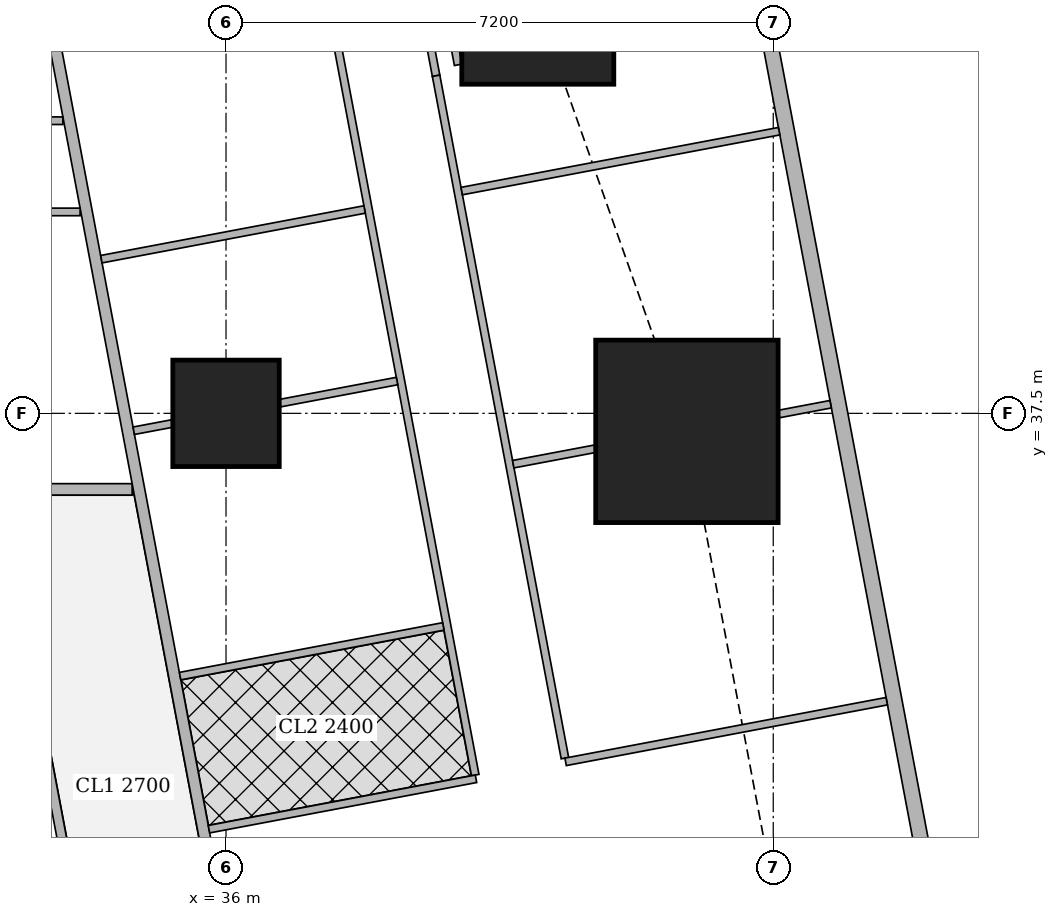
"""IFC4 building model, lengths in metres.
Left out: names, types, materials, properties, quantities, classifications, styles, units other than length and angle.
Written with IfcOpenShell. Run it as: python <this file> out.ifc"""

import sys

from ifc_helpers import new_model, si_unit, direction, frame, frame_2d, origin, origin_2d, place, context, subcontext, project, spatial, rectangle, extrude, element, fill, save


model = new_model("IFC4")
c1 = context("Model", 3, precision=1e-05, world=origin(), true_north=direction((0.0, 1.0)))
c2 = subcontext(c1, "Body", "Model", "MODEL_VIEW")
j1 = project(units=[si_unit("LENGTHUNIT", "METRE"), si_unit("PLANEANGLEUNIT", "RADIAN")], contexts=[c1])
p1 = place(None, origin())
s1 = spatial("IfcSite", under=j1, at=p1, CompositionType="ELEMENT")
p2 = place(p1, origin())
s2 = spatial("IfcBuilding", under=s1, at=p2, CompositionType="ELEMENT")
p3 = place(p2, frame((0.0, 0.0, 204.95)))
s3 = spatial("IfcBuildingStorey", under=s2, at=p3, CompositionType="ELEMENT", Elevation=204.95)
p4 = place(p3, frame((36.0, 37.5, 0.0), z_axis=(0.0, 0.0, 1.0), x_axis=(1.0, 0.0, 0.0)))
e1 = element("IfcColumn", 1, at=p4, inside=s3, PredefinedType="COLUMN", context=c2, shape_type="SweptSolid", body=[
    extrude(rectangle(XDim=1.4, YDim=1.4, at=origin_2d()), origin(), (0.0, 0.0, 1.0), 3.75),
])
p5 = place(p3, frame((42.064, 37.263, 0.0), z_axis=(0.0, 0.0, 1.0), x_axis=(1.0, 0.0, 0.0)))
e2 = element("IfcColumn", 2, at=p5, inside=s3, PredefinedType="COLUMN", context=c2, shape_type="SweptSolid", body=[
    extrude(rectangle(XDim=2.4, YDim=2.4, at=origin_2d()), origin(), (0.0, 0.0, 1.0), 3.75),
])
p6 = place(p3, frame((40.102, 42.83, 0.0), z_axis=(0.0, 0.0, 1.0), x_axis=(1.0, 0.0, 0.0)))
e3 = element("IfcColumn", 3, at=p6, inside=s3, PredefinedType="COLUMN", context=c2, shape_type="SweptSolid", body=[
    extrude(rectangle(XDim=2.0, YDim=2.0, at=origin_2d()), origin(), (0.0, 0.0, 1.0), 3.75),
])
p7 = place(p3, frame((50.653, 2.703, 0.0), z_axis=(0.0, 0.0, 1.0), x_axis=(-0.185612026696, 0.982623109613, 0.0)))
e4 = element("IfcWall", 4, at=p7, inside=s3, PredefinedType="SOLIDWALL", context=c2, shape_type="SweptSolid", body=[
    extrude(rectangle(XDim=41.393, YDim=0.2, at=frame_2d((20.697, 0.0))), origin(), (0.0, 0.0, 1.0), 3.5),
])
p8 = place(p7, frame((1.633, 0.0, 0.9)))
e5 = element("IfcOpeningElement", 5, at=p8, cuts=e4, PredefinedType="OPENING", context=c2, shape_type="SweptSolid", body=[
    extrude(rectangle(XDim=1.8, YDim=1.5, at=frame_2d((0.9, 0.75))), frame((0.0, 0.11, 0.0), z_axis=(0.0, -1.0, 0.0), x_axis=(1.0, 0.0, 0.0)), (0.0, 0.0, 1.0), 0.22),
])
p9 = place(p7, frame((6.032, 0.0, 0.9)))
e6 = element("IfcOpeningElement", 6, at=p9, cuts=e4, PredefinedType="OPENING", context=c2, shape_type="SweptSolid", body=[
    extrude(rectangle(XDim=1.8, YDim=1.5, at=frame_2d((0.9, 0.75))), frame((0.0, 0.11, 0.0), z_axis=(0.0, -1.0, 0.0), x_axis=(1.0, 0.0, 0.0)), (0.0, 0.0, 1.0), 0.22),
])
p10 = place(p7, frame((9.848, 0.0, 0.9)))
e7 = element("IfcOpeningElement", 7, at=p10, cuts=e4, PredefinedType="OPENING", context=c2, shape_type="SweptSolid", body=[
    extrude(rectangle(XDim=1.8, YDim=1.5, at=frame_2d((0.9, 0.75))), frame((0.0, 0.11, 0.0), z_axis=(0.0, -1.0, 0.0), x_axis=(1.0, 0.0, 0.0)), (0.0, 0.0, 1.0), 0.22),
])
p11 = place(p7, frame((13.664, 0.0, 0.9)))
e8 = element("IfcOpeningElement", 8, at=p11, cuts=e4, PredefinedType="OPENING", context=c2, shape_type="SweptSolid", body=[
    extrude(rectangle(XDim=1.8, YDim=1.5, at=frame_2d((0.9, 0.75))), frame((0.0, 0.11, 0.0), z_axis=(0.0, -1.0, 0.0), x_axis=(1.0, 0.0, 0.0)), (0.0, 0.0, 1.0), 0.22),
])
p12 = place(p7, frame((17.481, 0.0, 0.9)))
e9 = element("IfcOpeningElement", 9, at=p12, cuts=e4, PredefinedType="OPENING", context=c2, shape_type="SweptSolid", body=[
    extrude(rectangle(XDim=1.8, YDim=1.5, at=frame_2d((0.9, 0.75))), frame((0.0, 0.11, 0.0), z_axis=(0.0, -1.0, 0.0), x_axis=(1.0, 0.0, 0.0)), (0.0, 0.0, 1.0), 0.22),
])
p13 = place(p7, frame((21.297, 0.0, 0.9)))
e10 = element("IfcOpeningElement", 10, at=p13, cuts=e4, PredefinedType="OPENING", context=c2, shape_type="SweptSolid", body=[
    extrude(rectangle(XDim=1.8, YDim=1.5, at=frame_2d((0.9, 0.75))), frame((0.0, 0.11, 0.0), z_axis=(0.0, -1.0, 0.0), x_axis=(1.0, 0.0, 0.0)), (0.0, 0.0, 1.0), 0.22),
])
p14 = place(p7, frame((25.113, 0.0, 0.9)))
e11 = element("IfcOpeningElement", 11, at=p14, cuts=e4, PredefinedType="OPENING", context=c2, shape_type="SweptSolid", body=[
    extrude(rectangle(XDim=1.8, YDim=1.5, at=frame_2d((0.9, 0.75))), frame((0.0, 0.11, 0.0), z_axis=(0.0, -1.0, 0.0), x_axis=(1.0, 0.0, 0.0)), (0.0, 0.0, 1.0), 0.22),
])
p15 = place(p7, frame((28.93, 0.0, 0.9)))
e12 = element("IfcOpeningElement", 12, at=p15, cuts=e4, PredefinedType="OPENING", context=c2, shape_type="SweptSolid", body=[
    extrude(rectangle(XDim=1.8, YDim=1.5, at=frame_2d((0.9, 0.75))), frame((0.0, 0.11, 0.0), z_axis=(0.0, -1.0, 0.0), x_axis=(1.0, 0.0, 0.0)), (0.0, 0.0, 1.0), 0.22),
])
p16 = place(p7, frame((32.746, 0.0, 0.9)))
e13 = element("IfcOpeningElement", 13, at=p16, cuts=e4, PredefinedType="OPENING", context=c2, shape_type="SweptSolid", body=[
    extrude(rectangle(XDim=1.8, YDim=1.5, at=frame_2d((0.9, 0.75))), frame((0.0, 0.11, 0.0), z_axis=(0.0, -1.0, 0.0), x_axis=(1.0, 0.0, 0.0)), (0.0, 0.0, 1.0), 0.22),
])
p17 = place(p7, frame((36.481, 0.0, 0.9)))
e14 = element("IfcOpeningElement", 14, at=p17, cuts=e4, PredefinedType="OPENING", context=c2, shape_type="SweptSolid", body=[
    extrude(rectangle(XDim=1.8, YDim=1.5, at=frame_2d((0.9, 0.75))), frame((0.0, 0.11, 0.0), z_axis=(0.0, -1.0, 0.0), x_axis=(1.0, 0.0, 0.0)), (0.0, 0.0, 1.0), 0.22),
])
p18 = place(p3, frame((9.001, 36.5, 0.0), z_axis=(0.0, 0.0, 1.0), x_axis=(1.0, 0.0, 0.0)))
e15 = element("IfcWall", 15, at=p18, inside=s3, PredefinedType="SOLIDWALL", context=c2, shape_type="SweptSolid", body=[
    extrude(rectangle(XDim=25.764, YDim=0.15, at=frame_2d((12.882, 0.0))), origin(), (0.0, 0.0, 1.0), 3.5),
])
p19 = place(p18, frame((0.874, 0.0, 0.0)))
e16 = element("IfcOpeningElement", 16, at=p19, cuts=e15, PredefinedType="OPENING", context=c2, shape_type="SweptSolid", body=[
    extrude(rectangle(XDim=1.0, YDim=2.1, at=frame_2d((0.5, 1.05))), frame((0.0, 0.085, 0.0), z_axis=(0.0, -1.0, 0.0), x_axis=(1.0, 0.0, 0.0)), (0.0, 0.0, 1.0), 0.17),
])
p20 = place(p18, frame((10.099, 0.0, 0.0)))
e17 = element("IfcOpeningElement", 17, at=p20, cuts=e15, PredefinedType="OPENING", context=c2, shape_type="SweptSolid", body=[
    extrude(rectangle(XDim=1.0, YDim=2.1, at=frame_2d((0.5, 1.05))), frame((0.0, 0.085, 0.0), z_axis=(0.0, -1.0, 0.0), x_axis=(1.0, 0.0, 0.0)), (0.0, 0.0, 1.0), 0.17),
])
p21 = place(p18, frame((17.356, 0.0, 0.0)))
e18 = element("IfcOpeningElement", 18, at=p21, cuts=e15, PredefinedType="OPENING", context=c2, shape_type="SweptSolid", body=[
    extrude(rectangle(XDim=1.0, YDim=2.1, at=frame_2d((0.5, 1.05))), frame((0.0, 0.085, 0.0), z_axis=(0.0, -1.0, 0.0), x_axis=(1.0, 0.0, 0.0)), (0.0, 0.0, 1.0), 0.17),
])
p22 = place(p3, frame((33.68, 42.723, 0.0), z_axis=(0.0, 0.0, 1.0), x_axis=(0.185601160014, -0.982625162207, 0.0)))
e19 = element("IfcWall", 19, at=p22, inside=s3, PredefinedType="SOLIDWALL", context=c2, shape_type="SweptSolid", body=[
    extrude(rectangle(XDim=41.051, YDim=0.15, at=frame_2d((20.526, 0.0))), origin(), (0.0, 0.0, 1.0), 2.5),
])
p23 = place(p22, frame((12.307, 0.0, 0.0)))
e20 = element("IfcOpeningElement", 20, at=p23, cuts=e19, PredefinedType="OPENING", context=c2, shape_type="SweptSolid", body=[
    extrude(rectangle(XDim=1.0, YDim=2.1, at=frame_2d((0.5, 1.05))), frame((0.0, 0.085, 0.0), z_axis=(0.0, -1.0, 0.0), x_axis=(1.0, 0.0, 0.0)), (0.0, 0.0, 1.0), 0.17),
])
p24 = place(p22, frame((16.123, 0.0, 0.0)))
e21 = element("IfcOpeningElement", 21, at=p24, cuts=e19, PredefinedType="OPENING", context=c2, shape_type="SweptSolid", body=[
    extrude(rectangle(XDim=1.0, YDim=2.1, at=frame_2d((0.5, 1.05))), frame((0.0, 0.085, 0.0), z_axis=(0.0, -1.0, 0.0), x_axis=(1.0, 0.0, 0.0)), (0.0, 0.0, 1.0), 0.17),
])
p25 = place(p22, frame((30.902, 0.0, 0.0)))
e22 = element("IfcOpeningElement", 22, at=p25, cuts=e19, PredefinedType="OPENING", context=c2, shape_type="SweptSolid", body=[
    extrude(rectangle(XDim=1.0, YDim=2.1, at=frame_2d((0.5, 1.05))), frame((0.0, 0.085, 0.0), z_axis=(0.0, -1.0, 0.0), x_axis=(1.0, 0.0, 0.0)), (0.0, 0.0, 1.0), 0.17),
])
p26 = place(p3, frame((39.054, 42.085, 0.0), z_axis=(0.0, 0.0, 1.0), x_axis=(-0.185791584218, 0.982589175207, 0.0)))
e23 = element("IfcWall", 23, at=p26, inside=s3, PredefinedType="PARTITIONING", context=c2, shape_type="SweptSolid", body=[
    extrude(rectangle(XDim=3.628, YDim=0.1, at=frame_2d((1.814, 0.0))), origin(), (0.0, 0.0, 1.0), 2.05),
])
p27 = place(p3, frame((38.256, 44.628, 0.0), z_axis=(0.0, 0.0, 1.0), x_axis=(0.185700639943, -0.982606366927, 0.0)))
e24 = element("IfcWall", 24, at=p27, inside=s3, PredefinedType="PARTITIONING", context=c2, shape_type="SweptSolid", body=[
    extrude(rectangle(XDim=2.735, YDim=0.1, at=frame_2d((1.367, 0.0))), origin(), (0.0, 0.0, 1.0), 2.05),
])
p28 = place(p3, frame((38.764, 41.941, 0.0), z_axis=(0.0, 0.0, 1.0), x_axis=(0.185548572312, -0.982635093671, 0.0)))
e25 = element("IfcWall", 25, at=p28, inside=s3, PredefinedType="PARTITIONING", context=c2, shape_type="SweptSolid", body=[
    extrude(rectangle(XDim=9.135, YDim=0.1, at=frame_2d((4.568, 0.0))), origin(), (0.0, 0.0, 1.0), 3.5),
])
p29 = place(p28, frame((8.085, 0.0, 0.0)))
e26 = element("IfcOpeningElement", 26, at=p29, cuts=e25, PredefinedType="OPENING", context=c2, shape_type="SweptSolid", body=[
    extrude(rectangle(XDim=0.9, YDim=2.1, at=frame_2d((0.45, 1.05))), frame((0.0, 0.06, 0.0), z_axis=(0.0, -1.0, 0.0), x_axis=(1.0, 0.0, 0.0)), (0.0, 0.0, 1.0), 0.12),
])
p30 = place(p28, frame((3.7, 0.0, 0.0)))
e27 = element("IfcOpeningElement", 27, at=p30, cuts=e25, PredefinedType="OPENING", context=c2, shape_type="SweptSolid", body=[
    extrude(rectangle(XDim=0.9, YDim=2.1, at=frame_2d((0.45, 1.05))), frame((0.0, 0.06, 0.0), z_axis=(0.0, -1.0, 0.0), x_axis=(1.0, 0.0, 0.0)), (0.0, 0.0, 1.0), 0.12),
])
p31 = place(p3, frame((37.473, 42.309, 0.0), z_axis=(0.0, 0.0, 1.0), x_axis=(0.185491912953, -0.982645790827, 0.0)))
e28 = element("IfcWall", 28, at=p31, inside=s3, PredefinedType="PARTITIONING", context=c2, shape_type="SweptSolid", body=[
    extrude(rectangle(XDim=9.737, YDim=0.1, at=frame_2d((4.869, 0.0))), origin(), (0.0, 0.0, 1.0), 3.5),
])
p32 = place(p31, frame((8.312, 0.0, 0.0)))
e29 = element("IfcOpeningElement", 29, at=p32, cuts=e28, PredefinedType="OPENING", context=c2, shape_type="SweptSolid", body=[
    extrude(rectangle(XDim=0.9, YDim=2.1, at=frame_2d((0.45, 1.05))), frame((0.0, 0.06, 0.0), z_axis=(0.0, -1.0, 0.0), x_axis=(1.0, 0.0, 0.0)), (0.0, 0.0, 1.0), 0.12),
])
p33 = place(p31, frame((2.853, 0.0, 0.0)))
e30 = element("IfcOpeningElement", 30, at=p33, cuts=e28, PredefinedType="OPENING", context=c2, shape_type="SweptSolid", body=[
    extrude(rectangle(XDim=0.9, YDim=2.1, at=frame_2d((0.45, 1.05))), frame((0.0, 0.06, 0.0), z_axis=(0.0, -1.0, 0.0), x_axis=(1.0, 0.0, 0.0)), (0.0, 0.0, 1.0), 0.12),
])
p34 = place(p31, frame((5.644, 0.0, 0.0)))
e31 = element("IfcOpeningElement", 31, at=p34, cuts=e28, PredefinedType="OPENING", context=c2, shape_type="SweptSolid", body=[
    extrude(rectangle(XDim=0.9, YDim=2.1, at=frame_2d((0.45, 1.05))), frame((0.0, 0.06, 0.0), z_axis=(0.0, -1.0, 0.0), x_axis=(1.0, 0.0, 0.0)), (0.0, 0.0, 1.0), 0.12),
])
p35 = place(p3, frame((43.277, 41.212, 0.0), z_axis=(0.0, 0.0, 1.0), x_axis=(-0.982665405803, -0.185387972203, 0.0)))
e32 = element("IfcWall", 32, at=p35, inside=s3, PredefinedType="PARTITIONING", context=c2, shape_type="SweptSolid", body=[
    extrude(rectangle(XDim=4.25, YDim=0.1, at=frame_2d((2.125, 0.0))), origin(), (0.0, 0.0, 1.0), 2.05),
])
p36 = place(p3, frame((43.955, 37.62, 0.0), z_axis=(0.0, 0.0, 1.0), x_axis=(-0.982495415327, -0.186286765128, 0.0)))
e33 = element("IfcWall", 33, at=p36, inside=s3, PredefinedType="PARTITIONING", context=c2, shape_type="SweptSolid", body=[
    extrude(rectangle(XDim=0.693, YDim=0.1, at=frame_2d((0.347, 0.0))), origin(), (0.0, 0.0, 1.0), 3.5),
])
p37 = place(p3, frame((40.854, 37.034, 0.0), z_axis=(0.0, 0.0, 1.0), x_axis=(-0.982651678759, -0.185460718839, 0.0)))
e34 = element("IfcWall", 34, at=p37, inside=s3, PredefinedType="PARTITIONING", context=c2, shape_type="SweptSolid", body=[
    extrude(rectangle(XDim=1.094, YDim=0.1, at=frame_2d((0.547, 0.0))), origin(), (0.0, 0.0, 1.0), 3.5),
])
p38 = place(p3, frame((44.693, 33.713, 0.0), z_axis=(0.0, 0.0, 1.0), x_axis=(-0.982633535512, -0.185556823879, 0.0)))
e35 = element("IfcWall", 35, at=p38, inside=s3, PredefinedType="PARTITIONING", context=c2, shape_type="SweptSolid", body=[
    extrude(rectangle(XDim=4.3, YDim=0.1, at=frame_2d((2.15, 0.0))), origin(), (0.0, 0.0, 1.0), 2.05),
])
p39 = place(p3, frame((37.823, 40.182, 0.0), z_axis=(0.0, 0.0, 1.0), x_axis=(-0.98263926043, -0.185526504472, 0.0)))
e36 = element("IfcWall", 36, at=p39, inside=s3, PredefinedType="PARTITIONING", context=c2, shape_type="SweptSolid", body=[
    extrude(rectangle(XDim=3.524, YDim=0.1, at=frame_2d((1.762, 0.0))), origin(), (0.0, 0.0, 1.0), 3.5),
])
p40 = place(p3, frame((38.25, 37.925, 0.0), z_axis=(0.0, 0.0, 1.0), x_axis=(-0.982610209589, -0.185680305934, 0.0)))
e37 = element("IfcWall", 37, at=p40, inside=s3, PredefinedType="PARTITIONING", context=c2, shape_type="SweptSolid", body=[
    extrude(rectangle(XDim=1.567, YDim=0.1, at=frame_2d((0.784, 0.0))), origin(), (0.0, 0.0, 1.0), 3.5),
])
p41 = place(p3, frame((35.29, 37.366, 0.0), z_axis=(0.0, 0.0, 1.0), x_axis=(-0.982715597703, -0.185121727606, 0.0)))
e38 = element("IfcWall", 38, at=p41, inside=s3, PredefinedType="PARTITIONING", context=c2, shape_type="SweptSolid", body=[
    extrude(rectangle(XDim=0.513, YDim=0.1, at=frame_2d((0.256, 0.0))), origin(), (0.0, 0.0, 1.0), 3.5),
])
p42 = place(p3, frame((39.289, 32.692, 0.0), z_axis=(0.0, 0.0, 1.0), x_axis=(-0.982662827464, -0.185401638399, 0.0)))
e39 = element("IfcWall", 39, at=p42, inside=s3, PredefinedType="PARTITIONING", context=c2, shape_type="SweptSolid", body=[
    extrude(rectangle(XDim=3.575, YDim=0.1, at=frame_2d((1.788, 0.0))), origin(), (0.0, 0.0, 1.0), 3.5),
])
p43 = place(p3, frame((38.859, 34.697, 0.0), z_axis=(0.0, 0.0, 1.0), x_axis=(-0.982626628545, -0.185593396635, 0.0)))
e40 = element("IfcWall", 40, at=p43, inside=s3, PredefinedType="PARTITIONING", context=c2, shape_type="SweptSolid", body=[
    extrude(rectangle(XDim=3.524, YDim=0.1, at=frame_2d((1.762, 0.0))), origin(), (0.0, 0.0, 1.0), 3.5),
])
p44 = place(p3, frame((28.8, 41.35, 0.0), z_axis=(0.0, 0.0, 1.0), x_axis=(1.0, 0.0, 0.0)))
e41 = element("IfcWall", 41, at=p44, inside=s3, PredefinedType="PARTITIONING", context=c2, shape_type="SweptSolid", body=[
    extrude(rectangle(XDim=5.053, YDim=0.1, at=frame_2d((2.526, 0.0))), origin(), (0.0, 0.0, 1.0), 3.5),
])
p45 = place(p44, frame((1.25, 0.0, 0.0)))
e42 = element("IfcOpeningElement", 42, at=p45, cuts=e41, PredefinedType="OPENING", context=c2, shape_type="SweptSolid", body=[
    extrude(rectangle(XDim=0.9, YDim=2.1, at=frame_2d((0.45, 1.05))), frame((0.0, 0.06, 0.0), z_axis=(0.0, -1.0, 0.0), x_axis=(1.0, 0.0, 0.0)), (0.0, 0.0, 1.0), 0.12),
])
p46 = place(p3, frame((28.8, 40.15, 0.0), z_axis=(0.0, 0.0, 1.0), x_axis=(1.0, 0.0, 0.0)))
e43 = element("IfcWall", 43, at=p46, inside=s3, PredefinedType="PARTITIONING", context=c2, shape_type="SweptSolid", body=[
    extrude(rectangle(XDim=5.28, YDim=0.1, at=frame_2d((2.64, 0.0))), origin(), (0.0, 0.0, 1.0), 3.5),
])
p47 = place(p46, frame((0.575, 0.0, 0.0)))
e44 = element("IfcOpeningElement", 44, at=p47, cuts=e43, PredefinedType="OPENING", context=c2, shape_type="SweptSolid", body=[
    extrude(rectangle(XDim=0.9, YDim=2.1, at=frame_2d((0.45, 1.05))), frame((0.0, 0.06, 0.0), z_axis=(0.0, -1.0, 0.0), x_axis=(1.0, 0.0, 0.0)), (0.0, 0.0, 1.0), 0.12),
])
p48 = place(p46, frame((4.23, 0.0, 0.0)))
e45 = element("IfcOpeningElement", 45, at=p48, cuts=e43, PredefinedType="OPENING", context=c2, shape_type="SweptSolid", body=[
    extrude(rectangle(XDim=0.9, YDim=2.1, at=frame_2d((0.45, 1.05))), frame((0.0, 0.06, 0.0), z_axis=(0.0, -1.0, 0.0), x_axis=(1.0, 0.0, 0.0)), (0.0, 0.0, 1.0), 0.12),
])
p49 = place(p46, frame((2.375, 0.0, 0.0)))
e46 = element("IfcOpeningElement", 46, at=p49, cuts=e43, PredefinedType="OPENING", context=c2, shape_type="SweptSolid", body=[
    extrude(rectangle(XDim=0.9, YDim=2.1, at=frame_2d((0.45, 1.05))), frame((0.0, 0.06, 0.0), z_axis=(0.0, -1.0, 0.0), x_axis=(1.0, 0.0, 0.0)), (0.0, 0.0, 1.0), 0.12),
])
p50 = place(p3, frame((37.9, 10.413, 0.0), z_axis=(0.0, 0.0, 1.0), x_axis=(-0.185589740669, 0.982627319058, 0.0)))
e47 = element("IfcWall", 47, at=p50, inside=s3, PredefinedType="PARTITIONING", context=c2, shape_type="SweptSolid", body=[
    extrude(rectangle(XDim=24.602, YDim=0.125, at=frame_2d((12.301, 0.0))), origin(), (0.0, 0.0, 1.0), 2.5),
])
p51 = place(p50, frame((0.708, 0.0, 0.0)))
e48 = element("IfcOpeningElement", 48, at=p51, cuts=e47, PredefinedType="OPENING", context=c2, shape_type="SweptSolid", body=[
    extrude(rectangle(XDim=1.0, YDim=2.1, at=frame_2d((0.5, 1.05))), frame((0.0, 0.073, 0.0), z_axis=(0.0, -1.0, 0.0), x_axis=(1.0, 0.0, 0.0)), (0.0, 0.0, 1.0), 0.145),
])
p52 = place(p50, frame((5.65, 0.0, 0.0)))
e49 = element("IfcOpeningElement", 49, at=p52, cuts=e47, PredefinedType="OPENING", context=c2, shape_type="SweptSolid", body=[
    extrude(rectangle(XDim=1.0, YDim=2.1, at=frame_2d((0.5, 1.05))), frame((0.0, 0.073, 0.0), z_axis=(0.0, -1.0, 0.0), x_axis=(1.0, 0.0, 0.0)), (0.0, 0.0, 1.0), 0.145),
])
p53 = place(p50, frame((13.124, 0.0, 0.0)))
e50 = element("IfcOpeningElement", 50, at=p53, cuts=e47, PredefinedType="OPENING", context=c2, shape_type="SweptSolid", body=[
    extrude(rectangle(XDim=1.0, YDim=2.1, at=frame_2d((0.5, 1.05))), frame((0.0, 0.073, 0.0), z_axis=(0.0, -1.0, 0.0), x_axis=(1.0, 0.0, 0.0)), (0.0, 0.0, 1.0), 0.145),
])
p54 = place(p50, frame((16.94, 0.0, 0.0)))
e51 = element("IfcOpeningElement", 51, at=p54, cuts=e47, PredefinedType="OPENING", context=c2, shape_type="SweptSolid", body=[
    extrude(rectangle(XDim=1.0, YDim=2.1, at=frame_2d((0.5, 1.05))), frame((0.0, 0.073, 0.0), z_axis=(0.0, -1.0, 0.0), x_axis=(1.0, 0.0, 0.0)), (0.0, 0.0, 1.0), 0.145),
])
p55 = place(p50, frame((20.9, 0.0, 0.0)))
e52 = element("IfcOpeningElement", 52, at=p55, cuts=e47, PredefinedType="OPENING", context=c2, shape_type="SweptSolid", body=[
    extrude(rectangle(XDim=1.0, YDim=2.1, at=frame_2d((0.5, 1.05))), frame((0.0, 0.073, 0.0), z_axis=(0.0, -1.0, 0.0), x_axis=(1.0, 0.0, 0.0)), (0.0, 0.0, 1.0), 0.145),
])
p56 = place(p15, origin())
e53 = element("IfcWindow", 53, at=p56, inside=s3, PartitioningType="SINGLE_PANEL", PredefinedType="WINDOW", context=c2, shape_type="SweptSolid", body=[
    extrude(rectangle(XDim=1.8, YDim=1.5, at=frame_2d((0.9, 0.75))), frame((0.0, 0.03, 0.0), z_axis=(0.0, -1.0, 0.0), x_axis=(1.0, 0.0, 0.0)), (0.0, 0.0, 1.0), 0.06),
])
fill(e12, e53)
p57 = place(p16, origin())
e54 = element("IfcWindow", 54, at=p57, inside=s3, PartitioningType="SINGLE_PANEL", PredefinedType="WINDOW", context=c2, shape_type="SweptSolid", body=[
    extrude(rectangle(XDim=1.8, YDim=1.5, at=frame_2d((0.9, 0.75))), frame((0.0, 0.03, 0.0), z_axis=(0.0, -1.0, 0.0), x_axis=(1.0, 0.0, 0.0)), (0.0, 0.0, 1.0), 0.06),
])
fill(e13, e54)
p58 = place(p17, origin())
e55 = element("IfcWindow", 55, at=p58, inside=s3, PartitioningType="SINGLE_PANEL", PredefinedType="WINDOW", context=c2, shape_type="SweptSolid", body=[
    extrude(rectangle(XDim=1.8, YDim=1.5, at=frame_2d((0.9, 0.75))), frame((0.0, 0.03, 0.0), z_axis=(0.0, -1.0, 0.0), x_axis=(1.0, 0.0, 0.0)), (0.0, 0.0, 1.0), 0.06),
])
fill(e14, e55)
p59 = place(p29, origin())
e56 = element("IfcDoor", 56, at=p59, inside=s3, OperationType="SINGLE_SWING_RIGHT", PredefinedType="DOOR", context=c2, shape_type="SweptSolid", body=[
    extrude(rectangle(XDim=0.9, YDim=2.1, at=frame_2d((0.45, 1.05))), frame((0.0, 0.025, 0.0), z_axis=(0.0, -1.0, 0.0), x_axis=(1.0, 0.0, 0.0)), (0.0, 0.0, 1.0), 0.05),
])
fill(e26, e56)
p60 = place(p30, origin())
e57 = element("IfcDoor", 57, at=p60, inside=s3, OperationType="SINGLE_SWING_RIGHT", PredefinedType="DOOR", context=c2, shape_type="SweptSolid", body=[
    extrude(rectangle(XDim=0.9, YDim=2.1, at=frame_2d((0.45, 1.05))), frame((0.0, 0.025, 0.0), z_axis=(0.0, -1.0, 0.0), x_axis=(1.0, 0.0, 0.0)), (0.0, 0.0, 1.0), 0.05),
])
fill(e27, e57)
p61 = place(p32, origin())
e58 = element("IfcDoor", 58, at=p61, inside=s3, OperationType="SINGLE_SWING_LEFT", PredefinedType="DOOR", context=c2, shape_type="SweptSolid", body=[
    extrude(rectangle(XDim=0.9, YDim=2.1, at=frame_2d((0.45, 1.05))), frame((0.0, 0.025, 0.0), z_axis=(0.0, -1.0, 0.0), x_axis=(1.0, 0.0, 0.0)), (0.0, 0.0, 1.0), 0.05),
])
fill(e29, e58)
p62 = place(p33, origin())
e59 = element("IfcDoor", 59, at=p62, inside=s3, OperationType="SINGLE_SWING_LEFT", PredefinedType="DOOR", context=c2, shape_type="SweptSolid", body=[
    extrude(rectangle(XDim=0.9, YDim=2.1, at=frame_2d((0.45, 1.05))), frame((0.0, 0.025, 0.0), z_axis=(0.0, -1.0, 0.0), x_axis=(1.0, 0.0, 0.0)), (0.0, 0.0, 1.0), 0.05),
])
fill(e30, e59)
p63 = place(p34, origin())
e60 = element("IfcDoor", 60, at=p63, inside=s3, OperationType="SINGLE_SWING_LEFT", PredefinedType="DOOR", context=c2, shape_type="SweptSolid", body=[
    extrude(rectangle(XDim=0.9, YDim=2.1, at=frame_2d((0.45, 1.05))), frame((0.0, 0.025, 0.0), z_axis=(0.0, -1.0, 0.0), x_axis=(1.0, 0.0, 0.0)), (0.0, 0.0, 1.0), 0.05),
])
fill(e31, e60)
p64 = place(p48, origin())
e61 = element("IfcDoor", 61, at=p64, inside=s3, OperationType="SINGLE_SWING_LEFT", PredefinedType="DOOR", context=c2, shape_type="SweptSolid", body=[
    extrude(rectangle(XDim=0.9, YDim=2.1, at=frame_2d((0.45, 1.05))), frame((0.0, 0.025, 0.0), z_axis=(0.0, -1.0, 0.0), x_axis=(1.0, 0.0, 0.0)), (0.0, 0.0, 1.0), 0.05),
])
fill(e45, e61)
p65 = place(p55, origin())
e62 = element("IfcDoor", 62, at=p65, inside=s3, OperationType="SINGLE_SWING_LEFT", PredefinedType="DOOR", context=c2, shape_type="SweptSolid", body=[
    extrude(rectangle(XDim=1.0, YDim=2.1, at=frame_2d((0.5, 1.05))), frame((0.0, 0.025, 0.0), z_axis=(0.0, -1.0, 0.0), x_axis=(1.0, 0.0, 0.0)), (0.0, 0.0, 1.0), 0.05),
])
fill(e52, e62)
save(model, sys.argv[1])
